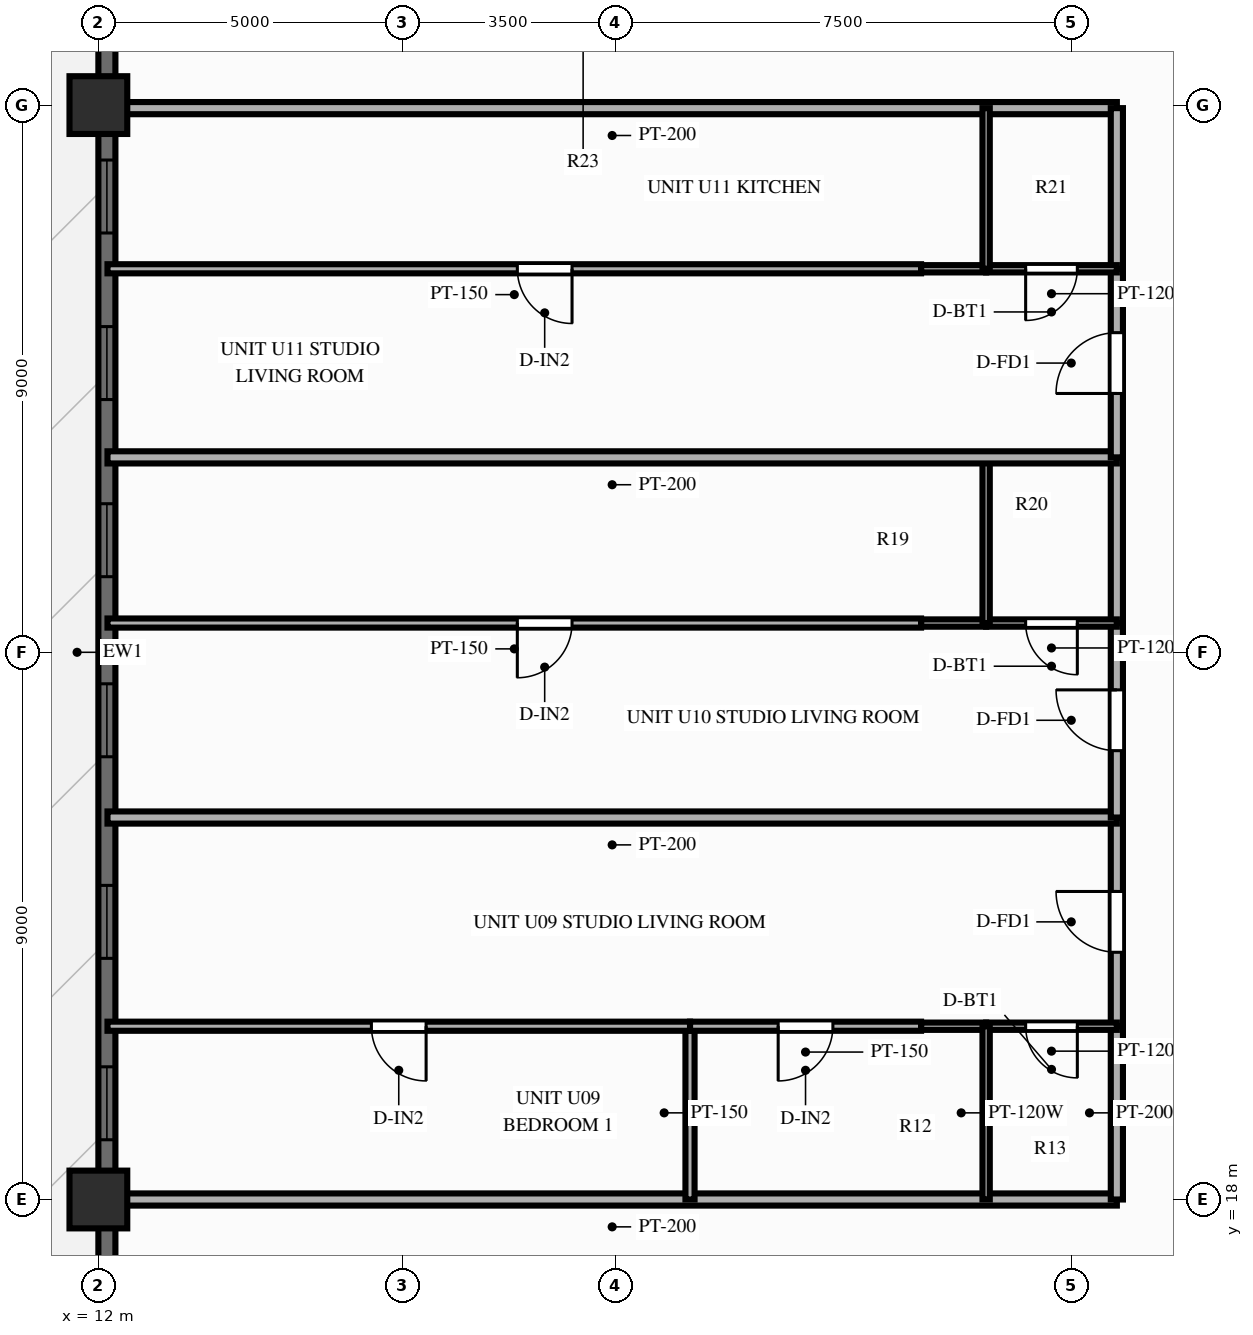
"""IFC4 building model, lengths in metres.
Left out: names, types, materials, properties, quantities, classifications, styles, units other than length and angle.
Written with IfcOpenShell. Run it as: python <this file> out.ifc"""

import sys

from ifc_helpers import new_model, si_unit, direction, frame, frame_2d, origin, origin_2d, place, context, subcontext, project, spatial, rectangle, extrude, source, transform, mapped, element, fill, save


model = new_model("IFC4")
c1 = context("Model", 3, precision=1e-05, world=origin(), true_north=direction((0.0, 1.0)))
c2 = subcontext(c1, "Body", "Model", "MODEL_VIEW")
j1 = project(units=[si_unit("LENGTHUNIT", "METRE"), si_unit("PLANEANGLEUNIT", "RADIAN")], contexts=[c1])
p1 = place(None, origin())
s1 = spatial("IfcSite", under=j1, at=p1, CompositionType="ELEMENT")
p2 = place(p1, origin())
s2 = spatial("IfcBuilding", under=s1, at=p2, CompositionType="ELEMENT")
p3 = place(p2, frame((0.0, 0.0, 89.85)))
s3 = spatial("IfcBuildingStorey", under=s2, at=p3, CompositionType="ELEMENT", Elevation=89.85)
m1 = source(origin(), c2, "Body", "SweptSolid", [
    extrude(rectangle(XDim=0.95, YDim=0.95, at=origin_2d()), origin(), (0.0, 0.0, 1.0), 3.0),
])
for number, where, z_axis, x_axis in (
    (1, (12.0, 36.0, 0.0), (0.0, 0.0, 1.0), (1.0, 0.0, 0.0)),
    (2, (12.0, 18.0, 0.0), (0.0, 0.0, 1.0), (1.0, 0.0, 0.0)),
):
    element("IfcColumn", number, at=place(p3, frame(where, z_axis=z_axis, x_axis=x_axis)), inside=s3, PredefinedType="COLUMN", context=c2, shape_type="MappedRepresentation", body=[
        mapped(m1, transform((0.0, 0.0, 0.0), scale=1.0)),
    ])
p4 = place(p3, frame((12.14, 7.2, 0.0), z_axis=(0.0, 0.0, 1.0), x_axis=(0.0, 1.0, 0.0)))
e3 = element("IfcWall", 3, at=p4, inside=s3, PredefinedType="SOLIDWALL", context=c2, shape_type="SweptSolid", body=[
    extrude(rectangle(XDim=39.6, YDim=0.28, at=frame_2d((19.8, 0.0))), origin(), (0.0, 0.0, 1.0), 2.28),
])
p5 = place(p4, frame((4.6, 0.0, 0.0)))
e4 = element("IfcOpeningElement", 4, at=p5, cuts=e3, PredefinedType="OPENING", context=c2, shape_type="SweptSolid", body=[
    extrude(rectangle(XDim=1.6, YDim=2.15, at=frame_2d((0.8, 1.075))), frame((0.0, 0.152, 0.0), z_axis=(0.0, -1.0, 0.0), x_axis=(1.0, 0.0, 0.0)), (0.0, 0.0, 1.0), 0.304),
])
p6 = place(p4, frame((11.782, 0.0, 0.25)))
e5 = element("IfcOpeningElement", 5, at=p6, cuts=e3, PredefinedType="OPENING", context=c2, shape_type="SweptSolid", body=[
    extrude(rectangle(XDim=1.2, YDim=1.5, at=frame_2d((0.6, 0.75))), frame((0.0, 0.152, 0.0), z_axis=(0.0, -1.0, 0.0), x_axis=(1.0, 0.0, 0.0)), (0.0, 0.0, 1.0), 0.304),
])
p7 = place(p4, frame((14.766, 0.0, 0.25)))
e6 = element("IfcOpeningElement", 6, at=p7, cuts=e3, PredefinedType="OPENING", context=c2, shape_type="SweptSolid", body=[
    extrude(rectangle(XDim=1.2, YDim=1.5, at=frame_2d((0.6, 0.75))), frame((0.0, 0.152, 0.0), z_axis=(0.0, -1.0, 0.0), x_axis=(1.0, 0.0, 0.0)), (0.0, 0.0, 1.0), 0.304),
])
p8 = place(p4, frame((18.082, 0.0, 0.25)))
e7 = element("IfcOpeningElement", 7, at=p8, cuts=e3, PredefinedType="OPENING", context=c2, shape_type="SweptSolid", body=[
    extrude(rectangle(XDim=1.2, YDim=1.5, at=frame_2d((0.6, 0.75))), frame((0.0, 0.152, 0.0), z_axis=(0.0, -1.0, 0.0), x_axis=(1.0, 0.0, 0.0)), (0.0, 0.0, 1.0), 0.304),
])
p9 = place(p4, frame((21.044, 0.0, 0.25)))
e8 = element("IfcOpeningElement", 8, at=p9, cuts=e3, PredefinedType="OPENING", context=c2, shape_type="SweptSolid", body=[
    extrude(rectangle(XDim=1.2, YDim=1.5, at=frame_2d((0.6, 0.75))), frame((0.0, 0.152, 0.0), z_axis=(0.0, -1.0, 0.0), x_axis=(1.0, 0.0, 0.0)), (0.0, 0.0, 1.0), 0.304),
])
p10 = place(p4, frame((23.957, 0.0, 0.25)))
e9 = element("IfcOpeningElement", 9, at=p10, cuts=e3, PredefinedType="OPENING", context=c2, shape_type="SweptSolid", body=[
    extrude(rectangle(XDim=1.2, YDim=1.5, at=frame_2d((0.6, 0.75))), frame((0.0, 0.152, 0.0), z_axis=(0.0, -1.0, 0.0), x_axis=(1.0, 0.0, 0.0)), (0.0, 0.0, 1.0), 0.304),
])
p11 = place(p4, frame((26.696, 0.0, 0.25)))
e10 = element("IfcOpeningElement", 10, at=p11, cuts=e3, PredefinedType="OPENING", context=c2, shape_type="SweptSolid", body=[
    extrude(rectangle(XDim=1.2, YDim=1.5, at=frame_2d((0.6, 0.75))), frame((0.0, 0.152, 0.0), z_axis=(0.0, -1.0, 0.0), x_axis=(1.0, 0.0, 0.0)), (0.0, 0.0, 1.0), 0.304),
])
p12 = place(p4, frame((33.6, 0.0, 0.25)))
e11 = element("IfcOpeningElement", 11, at=p12, cuts=e3, PredefinedType="OPENING", context=c2, shape_type="SweptSolid", body=[
    extrude(rectangle(XDim=1.2, YDim=1.5, at=frame_2d((0.6, 0.75))), frame((0.0, 0.152, 0.0), z_axis=(0.0, -1.0, 0.0), x_axis=(1.0, 0.0, 0.0)), (0.0, 0.0, 1.0), 0.304),
])
for number, where, z_axis, x_axis in (
    (12, (28.75, 18.0, 0.0), (0.0, 0.0, 1.0), (-1.0, 0.0, 0.0)),
    (13, (28.75, 35.95, 0.0), (0.0, 0.0, 1.0), (-1.0, 0.0, 0.0)),
):
    element("IfcWall", number, at=place(p3, frame(where, z_axis=z_axis, x_axis=x_axis)), inside=s3, PredefinedType="PARTITIONING", context=c2, shape_type="SweptSolid", body=[
        extrude(rectangle(XDim=16.6, YDim=0.2, at=frame_2d((8.3, 0.0))), origin(), (0.0, 0.0, 1.0), 2.34),
    ])
p13 = place(p3, frame((28.75, 18.0, 0.0), z_axis=(0.0, 0.0, 1.0), x_axis=(0.0, 1.0, 0.0)))
e14 = element("IfcWall", 14, at=p13, inside=s3, PredefinedType="PARTITIONING", context=c2, shape_type="SweptSolid", body=[
    extrude(rectangle(XDim=2.85, YDim=0.2, at=frame_2d((1.425, 0.0))), origin(), (0.0, 0.0, 1.0), 2.79),
])
p14 = place(p3, frame((28.75, 20.85, 0.0), z_axis=(0.0, 0.0, 1.0), x_axis=(0.0, 1.0, 0.0)))
e15 = element("IfcWall", 15, at=p14, inside=s3, PredefinedType="PARTITIONING", context=c2, shape_type="SweptSolid", body=[
    extrude(rectangle(XDim=3.432, YDim=0.2, at=frame_2d((1.716, 0.0))), origin(), (0.0, 0.0, 1.0), 2.79),
])
p15 = place(p14, frame((1.216, 0.0, 0.0)))
e16 = element("IfcOpeningElement", 16, at=p15, cuts=e15, PredefinedType="OPENING", context=c2, shape_type="SweptSolid", body=[
    extrude(rectangle(XDim=1.0, YDim=2.15, at=frame_2d((0.5, 1.075))), frame((0.0, 0.112, 0.0), z_axis=(0.0, -1.0, 0.0), x_axis=(1.0, 0.0, 0.0)), (0.0, 0.0, 1.0), 0.224),
])
p16 = place(p3, frame((28.75, 20.85, 0.0), z_axis=(0.0, 0.0, 1.0), x_axis=(-1.0, 0.0, 0.0)))
e17 = element("IfcWall", 17, at=p16, inside=s3, PredefinedType="PARTITIONING", context=c2, shape_type="SweptSolid", body=[
    extrude(rectangle(XDim=2.15, YDim=0.12, at=frame_2d((1.075, 0.0))), origin(), (0.0, 0.0, 1.0), 2.79),
])
p17 = place(p16, frame((0.65, 0.0, 0.0)))
e18 = element("IfcOpeningElement", 18, at=p17, cuts=e17, PredefinedType="OPENING", context=c2, shape_type="SweptSolid", body=[
    extrude(rectangle(XDim=0.85, YDim=2.05, at=frame_2d((0.425, 1.025))), frame((0.0, 0.072, 0.0), z_axis=(0.0, -1.0, 0.0), x_axis=(1.0, 0.0, 0.0)), (0.0, 0.0, 1.0), 0.144),
])
p18 = place(p3, frame((26.6, 20.85, 0.0), z_axis=(0.0, 0.0, 1.0), x_axis=(-1.0, 0.0, 0.0)))
e19 = element("IfcWall", 19, at=p18, inside=s3, PredefinedType="PARTITIONING", context=c2, shape_type="SweptSolid", body=[
    extrude(rectangle(XDim=1.07, YDim=0.12, at=frame_2d((0.535, 0.0))), origin(), (0.0, 0.0, 1.0), 2.79),
])
p19 = place(p3, frame((26.6, 18.0, 0.0), z_axis=(0.0, 0.0, 1.0), x_axis=(0.0, 1.0, 0.0)))
e20 = element("IfcWall", 20, at=p19, inside=s3, PredefinedType="PARTITIONING", context=c2, shape_type="SweptSolid", body=[
    extrude(rectangle(XDim=2.85, YDim=0.12, at=frame_2d((1.425, 0.0))), origin(), (0.0, 0.0, 1.0), 2.79),
])
p20 = place(p3, frame((21.73, 18.0, 0.0), z_axis=(0.0, 0.0, 1.0), x_axis=(0.0, 1.0, 0.0)))
e21 = element("IfcWall", 21, at=p20, inside=s3, PredefinedType="PARTITIONING", context=c2, shape_type="SweptSolid", body=[
    extrude(rectangle(XDim=2.85, YDim=0.15, at=frame_2d((1.425, 0.0))), origin(), (0.0, 0.0, 1.0), 2.49),
])
p21 = place(p3, frame((25.53, 20.85, 0.0), z_axis=(0.0, 0.0, 1.0), x_axis=(-1.0, 0.0, 0.0)))
e22 = element("IfcWall", 22, at=p21, inside=s3, PredefinedType="PARTITIONING", context=c2, shape_type="SweptSolid", body=[
    extrude(rectangle(XDim=3.8, YDim=0.15, at=frame_2d((1.9, 0.0))), origin(), (0.0, 0.0, 1.0), 2.79),
])
p22 = place(p21, frame((1.45, 0.0, 0.0)))
e23 = element("IfcOpeningElement", 23, at=p22, cuts=e22, PredefinedType="OPENING", context=c2, shape_type="SweptSolid", body=[
    extrude(rectangle(XDim=0.9, YDim=2.1, at=frame_2d((0.45, 1.05))), frame((0.0, 0.087, 0.0), z_axis=(0.0, -1.0, 0.0), x_axis=(1.0, 0.0, 0.0)), (0.0, 0.0, 1.0), 0.174),
])
p23 = place(p3, frame((21.73, 20.85, 0.0), z_axis=(0.0, 0.0, 1.0), x_axis=(-1.0, 0.0, 0.0)))
e24 = element("IfcWall", 24, at=p23, inside=s3, PredefinedType="PARTITIONING", context=c2, shape_type="SweptSolid", body=[
    extrude(rectangle(XDim=9.58, YDim=0.15, at=frame_2d((4.79, 0.0))), origin(), (0.0, 0.0, 1.0), 2.79),
])
p24 = place(p23, frame((4.34, 0.0, 0.0)))
e25 = element("IfcOpeningElement", 25, at=p24, cuts=e24, PredefinedType="OPENING", context=c2, shape_type="SweptSolid", body=[
    extrude(rectangle(XDim=0.9, YDim=2.1, at=frame_2d((0.45, 1.05))), frame((0.0, 0.087, 0.0), z_axis=(0.0, -1.0, 0.0), x_axis=(1.0, 0.0, 0.0)), (0.0, 0.0, 1.0), 0.174),
])
p25 = place(p3, frame((28.75, 24.282, 0.0), z_axis=(0.0, 0.0, 1.0), x_axis=(-1.0, 0.0, 0.0)))
e26 = element("IfcWall", 26, at=p25, inside=s3, PredefinedType="PARTITIONING", context=c2, shape_type="SweptSolid", body=[
    extrude(rectangle(XDim=16.6, YDim=0.2, at=frame_2d((8.3, 0.0))), origin(), (0.0, 0.0, 1.0), 2.79),
])
p26 = place(p3, frame((28.75, 24.282, 0.0), z_axis=(0.0, 0.0, 1.0), x_axis=(0.0, 1.0, 0.0)))
e27 = element("IfcWall", 27, at=p26, inside=s3, PredefinedType="PARTITIONING", context=c2, shape_type="SweptSolid", body=[
    extrude(rectangle(XDim=3.199, YDim=0.2, at=frame_2d((1.599, 0.0))), origin(), (0.0, 0.0, 1.0), 2.79),
])
p27 = place(p26, frame((1.099, 0.0, 0.0)))
e28 = element("IfcOpeningElement", 28, at=p27, cuts=e27, PredefinedType="OPENING", context=c2, shape_type="SweptSolid", body=[
    extrude(rectangle(XDim=1.0, YDim=2.15, at=frame_2d((0.5, 1.075))), frame((0.0, 0.112, 0.0), z_axis=(0.0, -1.0, 0.0), x_axis=(1.0, 0.0, 0.0)), (0.0, 0.0, 1.0), 0.224),
])
p28 = place(p3, frame((28.75, 27.481, 0.0), z_axis=(0.0, 0.0, 1.0), x_axis=(0.0, 1.0, 0.0)))
e29 = element("IfcWall", 29, at=p28, inside=s3, PredefinedType="PARTITIONING", context=c2, shape_type="SweptSolid", body=[
    extrude(rectangle(XDim=2.725, YDim=0.2, at=frame_2d((1.362, 0.0))), origin(), (0.0, 0.0, 1.0), 2.79),
])
p29 = place(p3, frame((28.75, 27.481, 0.0), z_axis=(0.0, 0.0, 1.0), x_axis=(-1.0, 0.0, 0.0)))
e30 = element("IfcWall", 30, at=p29, inside=s3, PredefinedType="PARTITIONING", context=c2, shape_type="SweptSolid", body=[
    extrude(rectangle(XDim=2.15, YDim=0.12, at=frame_2d((1.075, 0.0))), origin(), (0.0, 0.0, 1.0), 2.79),
])
p30 = place(p29, frame((0.65, 0.0, 0.0)))
e31 = element("IfcOpeningElement", 31, at=p30, cuts=e30, PredefinedType="OPENING", context=c2, shape_type="SweptSolid", body=[
    extrude(rectangle(XDim=0.85, YDim=2.05, at=frame_2d((0.425, 1.025))), frame((0.0, 0.072, 0.0), z_axis=(0.0, -1.0, 0.0), x_axis=(1.0, 0.0, 0.0)), (0.0, 0.0, 1.0), 0.144),
])
p31 = place(p3, frame((26.6, 27.481, 0.0), z_axis=(0.0, 0.0, 1.0), x_axis=(-1.0, 0.0, 0.0)))
e32 = element("IfcWall", 32, at=p31, inside=s3, PredefinedType="PARTITIONING", context=c2, shape_type="SweptSolid", body=[
    extrude(rectangle(XDim=1.07, YDim=0.12, at=frame_2d((0.535, 0.0))), origin(), (0.0, 0.0, 1.0), 2.79),
])
p32 = place(p3, frame((26.6, 27.481, 0.0), z_axis=(0.0, 0.0, 1.0), x_axis=(0.0, 1.0, 0.0)))
e33 = element("IfcWall", 33, at=p32, inside=s3, PredefinedType="PARTITIONING", context=c2, shape_type="SweptSolid", body=[
    extrude(rectangle(XDim=2.725, YDim=0.12, at=frame_2d((1.362, 0.0))), origin(), (0.0, 0.0, 1.0), 2.79),
])
p33 = place(p3, frame((25.53, 27.481, 0.0), z_axis=(0.0, 0.0, 1.0), x_axis=(-1.0, 0.0, 0.0)))
e34 = element("IfcWall", 34, at=p33, inside=s3, PredefinedType="PARTITIONING", context=c2, shape_type="SweptSolid", body=[
    extrude(rectangle(XDim=13.38, YDim=0.15, at=frame_2d((6.69, 0.0))), origin(), (0.0, 0.0, 1.0), 2.79),
])
p34 = place(p33, frame((5.74, 0.0, 0.0)))
e35 = element("IfcOpeningElement", 35, at=p34, cuts=e34, PredefinedType="OPENING", context=c2, shape_type="SweptSolid", body=[
    extrude(rectangle(XDim=0.9, YDim=2.1, at=frame_2d((0.45, 1.05))), frame((0.0, 0.087, 0.0), z_axis=(0.0, -1.0, 0.0), x_axis=(1.0, 0.0, 0.0)), (0.0, 0.0, 1.0), 0.174),
])
p35 = place(p3, frame((28.75, 30.206, 0.0), z_axis=(0.0, 0.0, 1.0), x_axis=(-1.0, 0.0, 0.0)))
e36 = element("IfcWall", 36, at=p35, inside=s3, PredefinedType="PARTITIONING", context=c2, shape_type="SweptSolid", body=[
    extrude(rectangle(XDim=16.6, YDim=0.2, at=frame_2d((8.3, 0.0))), origin(), (0.0, 0.0, 1.0), 2.79),
])
p36 = place(p3, frame((28.75, 30.206, 0.0), z_axis=(0.0, 0.0, 1.0), x_axis=(0.0, 1.0, 0.0)))
e37 = element("IfcWall", 37, at=p36, inside=s3, PredefinedType="PARTITIONING", context=c2, shape_type="SweptSolid", body=[
    extrude(rectangle(XDim=3.102, YDim=0.2, at=frame_2d((1.551, 0.0))), origin(), (0.0, 0.0, 1.0), 2.79),
])
p37 = place(p36, frame((1.051, 0.0, 0.0)))
e38 = element("IfcOpeningElement", 38, at=p37, cuts=e37, PredefinedType="OPENING", context=c2, shape_type="SweptSolid", body=[
    extrude(rectangle(XDim=1.0, YDim=2.15, at=frame_2d((0.5, 1.075))), frame((0.0, 0.112, 0.0), z_axis=(0.0, -1.0, 0.0), x_axis=(1.0, 0.0, 0.0)), (0.0, 0.0, 1.0), 0.224),
])
p38 = place(p3, frame((28.75, 33.308, 0.0), z_axis=(0.0, 0.0, 1.0), x_axis=(0.0, 1.0, 0.0)))
e39 = element("IfcWall", 39, at=p38, inside=s3, PredefinedType="PARTITIONING", context=c2, shape_type="SweptSolid", body=[
    extrude(rectangle(XDim=2.642, YDim=0.2, at=frame_2d((1.321, 0.0))), origin(), (0.0, 0.0, 1.0), 2.79),
])
p39 = place(p3, frame((28.75, 33.308, 0.0), z_axis=(0.0, 0.0, 1.0), x_axis=(-1.0, 0.0, 0.0)))
e40 = element("IfcWall", 40, at=p39, inside=s3, PredefinedType="PARTITIONING", context=c2, shape_type="SweptSolid", body=[
    extrude(rectangle(XDim=2.15, YDim=0.12, at=frame_2d((1.075, 0.0))), origin(), (0.0, 0.0, 1.0), 2.79),
])
p40 = place(p39, frame((0.65, 0.0, 0.0)))
e41 = element("IfcOpeningElement", 41, at=p40, cuts=e40, PredefinedType="OPENING", context=c2, shape_type="SweptSolid", body=[
    extrude(rectangle(XDim=0.85, YDim=2.05, at=frame_2d((0.425, 1.025))), frame((0.0, 0.072, 0.0), z_axis=(0.0, -1.0, 0.0), x_axis=(1.0, 0.0, 0.0)), (0.0, 0.0, 1.0), 0.144),
])
p41 = place(p3, frame((26.6, 33.308, 0.0), z_axis=(0.0, 0.0, 1.0), x_axis=(-1.0, 0.0, 0.0)))
e42 = element("IfcWall", 42, at=p41, inside=s3, PredefinedType="PARTITIONING", context=c2, shape_type="SweptSolid", body=[
    extrude(rectangle(XDim=1.07, YDim=0.12, at=frame_2d((0.535, 0.0))), origin(), (0.0, 0.0, 1.0), 2.79),
])
p42 = place(p3, frame((26.6, 33.308, 0.0), z_axis=(0.0, 0.0, 1.0), x_axis=(0.0, 1.0, 0.0)))
e43 = element("IfcWall", 43, at=p42, inside=s3, PredefinedType="PARTITIONING", context=c2, shape_type="SweptSolid", body=[
    extrude(rectangle(XDim=2.642, YDim=0.12, at=frame_2d((1.321, 0.0))), origin(), (0.0, 0.0, 1.0), 2.79),
])
p43 = place(p3, frame((25.53, 33.308, 0.0), z_axis=(0.0, 0.0, 1.0), x_axis=(-1.0, 0.0, 0.0)))
e44 = element("IfcWall", 44, at=p43, inside=s3, PredefinedType="PARTITIONING", context=c2, shape_type="SweptSolid", body=[
    extrude(rectangle(XDim=13.38, YDim=0.15, at=frame_2d((6.69, 0.0))), origin(), (0.0, 0.0, 1.0), 2.79),
])
p44 = place(p43, frame((5.74, 0.0, 0.0)))
e45 = element("IfcOpeningElement", 45, at=p44, cuts=e44, PredefinedType="OPENING", context=c2, shape_type="SweptSolid", body=[
    extrude(rectangle(XDim=0.9, YDim=2.1, at=frame_2d((0.45, 1.05))), frame((0.0, 0.087, 0.0), z_axis=(0.0, -1.0, 0.0), x_axis=(1.0, 0.0, 0.0)), (0.0, 0.0, 1.0), 0.174),
])
m2 = source(origin(), c2, "Body", "SweptSolid", [
    extrude(rectangle(XDim=1.2, YDim=1.5, at=frame_2d((0.6, 0.75))), frame((0.0, 0.03, 0.0), z_axis=(0.0, -1.0, 0.0), x_axis=(1.0, 0.0, 0.0)), (0.0, 0.0, 1.0), 0.06),
])
p45 = place(p6, origin())
e46 = element("IfcWindow", 46, at=p45, inside=s3, PartitioningType="SINGLE_PANEL", PredefinedType="WINDOW", context=c2, shape_type="MappedRepresentation", body=[
    mapped(m2, transform((0.0, 0.0, 0.0), scale=1.0)),
])
fill(e5, e46)
p46 = place(p7, origin())
e47 = element("IfcWindow", 47, at=p46, inside=s3, PartitioningType="SINGLE_PANEL", PredefinedType="WINDOW", context=c2, shape_type="MappedRepresentation", body=[
    mapped(m2, transform((0.0, 0.0, 0.0), scale=1.0)),
])
fill(e6, e47)
p47 = place(p8, origin())
e48 = element("IfcWindow", 48, at=p47, inside=s3, PartitioningType="SINGLE_PANEL", PredefinedType="WINDOW", context=c2, shape_type="MappedRepresentation", body=[
    mapped(m2, transform((0.0, 0.0, 0.0), scale=1.0)),
])
fill(e7, e48)
p48 = place(p9, origin())
e49 = element("IfcWindow", 49, at=p48, inside=s3, PartitioningType="SINGLE_PANEL", PredefinedType="WINDOW", context=c2, shape_type="MappedRepresentation", body=[
    mapped(m2, transform((0.0, 0.0, 0.0), scale=1.0)),
])
fill(e8, e49)
p49 = place(p10, origin())
e50 = element("IfcWindow", 50, at=p49, inside=s3, PartitioningType="SINGLE_PANEL", PredefinedType="WINDOW", context=c2, shape_type="MappedRepresentation", body=[
    mapped(m2, transform((0.0, 0.0, 0.0), scale=1.0)),
])
fill(e9, e50)
p50 = place(p11, origin())
e51 = element("IfcWindow", 51, at=p50, inside=s3, PartitioningType="SINGLE_PANEL", PredefinedType="WINDOW", context=c2, shape_type="MappedRepresentation", body=[
    mapped(m2, transform((0.0, 0.0, 0.0), scale=1.0)),
])
fill(e10, e51)
m3 = source(origin(), c2, "Body", "SweptSolid", [
    extrude(rectangle(XDim=1.0, YDim=2.15, at=frame_2d((0.5, 1.075))), frame((0.0, 0.025, 0.0), z_axis=(0.0, -1.0, 0.0), x_axis=(1.0, 0.0, 0.0)), (0.0, 0.0, 1.0), 0.05),
])
p51 = place(p15, origin())
e52 = element("IfcDoor", 52, at=p51, inside=s3, OperationType="SINGLE_SWING_RIGHT", PredefinedType="DOOR", context=c2, shape_type="MappedRepresentation", body=[
    mapped(m3, transform((0.0, 0.0, 0.0), scale=1.0)),
])
fill(e16, e52)
m4 = source(origin(), c2, "Body", "SweptSolid", [
    extrude(rectangle(XDim=0.85, YDim=2.05, at=frame_2d((0.425, 1.025))), frame((0.0, 0.025, 0.0), z_axis=(0.0, -1.0, 0.0), x_axis=(1.0, 0.0, 0.0)), (0.0, 0.0, 1.0), 0.05),
])
p52 = place(p17, origin())
e53 = element("IfcDoor", 53, at=p52, inside=s3, OperationType="SINGLE_SWING_LEFT", PredefinedType="DOOR", context=c2, shape_type="MappedRepresentation", body=[
    mapped(m4, transform((0.0, 0.0, 0.0), scale=1.0)),
])
fill(e18, e53)
m5 = source(origin(), c2, "Body", "SweptSolid", [
    extrude(rectangle(XDim=0.9, YDim=2.1, at=frame_2d((0.45, 1.05))), frame((0.0, 0.025, 0.0), z_axis=(0.0, -1.0, 0.0), x_axis=(1.0, 0.0, 0.0)), (0.0, 0.0, 1.0), 0.05),
])
p53 = place(p22, origin())
e54 = element("IfcDoor", 54, at=p53, inside=s3, OperationType="SINGLE_SWING_RIGHT", PredefinedType="DOOR", context=c2, shape_type="MappedRepresentation", body=[
    mapped(m5, transform((0.0, 0.0, 0.0), scale=1.0)),
])
fill(e23, e54)
p54 = place(p24, origin())
e55 = element("IfcDoor", 55, at=p54, inside=s3, OperationType="SINGLE_SWING_LEFT", PredefinedType="DOOR", context=c2, shape_type="MappedRepresentation", body=[
    mapped(m5, transform((0.0, 0.0, 0.0), scale=1.0)),
])
fill(e25, e55)
p55 = place(p27, origin())
e56 = element("IfcDoor", 56, at=p55, inside=s3, OperationType="SINGLE_SWING_RIGHT", PredefinedType="DOOR", context=c2, shape_type="MappedRepresentation", body=[
    mapped(m3, transform((0.0, 0.0, 0.0), scale=1.0)),
])
fill(e28, e56)
p56 = place(p30, origin())
e57 = element("IfcDoor", 57, at=p56, inside=s3, OperationType="SINGLE_SWING_LEFT", PredefinedType="DOOR", context=c2, shape_type="MappedRepresentation", body=[
    mapped(m4, transform((0.0, 0.0, 0.0), scale=1.0)),
])
fill(e31, e57)
p57 = place(p34, origin())
e58 = element("IfcDoor", 58, at=p57, inside=s3, OperationType="SINGLE_SWING_RIGHT", PredefinedType="DOOR", context=c2, shape_type="MappedRepresentation", body=[
    mapped(m5, transform((0.0, 0.0, 0.0), scale=1.0)),
])
fill(e35, e58)
p58 = place(p37, origin())
e59 = element("IfcDoor", 59, at=p58, inside=s3, OperationType="SINGLE_SWING_LEFT", PredefinedType="DOOR", context=c2, shape_type="MappedRepresentation", body=[
    mapped(m3, transform((0.0, 0.0, 0.0), scale=1.0)),
])
fill(e38, e59)
p59 = place(p40, origin())
e60 = element("IfcDoor", 60, at=p59, inside=s3, OperationType="SINGLE_SWING_RIGHT", PredefinedType="DOOR", context=c2, shape_type="MappedRepresentation", body=[
    mapped(m4, transform((0.0, 0.0, 0.0), scale=1.0)),
])
fill(e41, e60)
p60 = place(p44, origin())
e61 = element("IfcDoor", 61, at=p60, inside=s3, OperationType="SINGLE_SWING_LEFT", PredefinedType="DOOR", context=c2, shape_type="MappedRepresentation", body=[
    mapped(m5, transform((0.0, 0.0, 0.0), scale=1.0)),
])
fill(e45, e61)
save(model, sys.argv[1])
